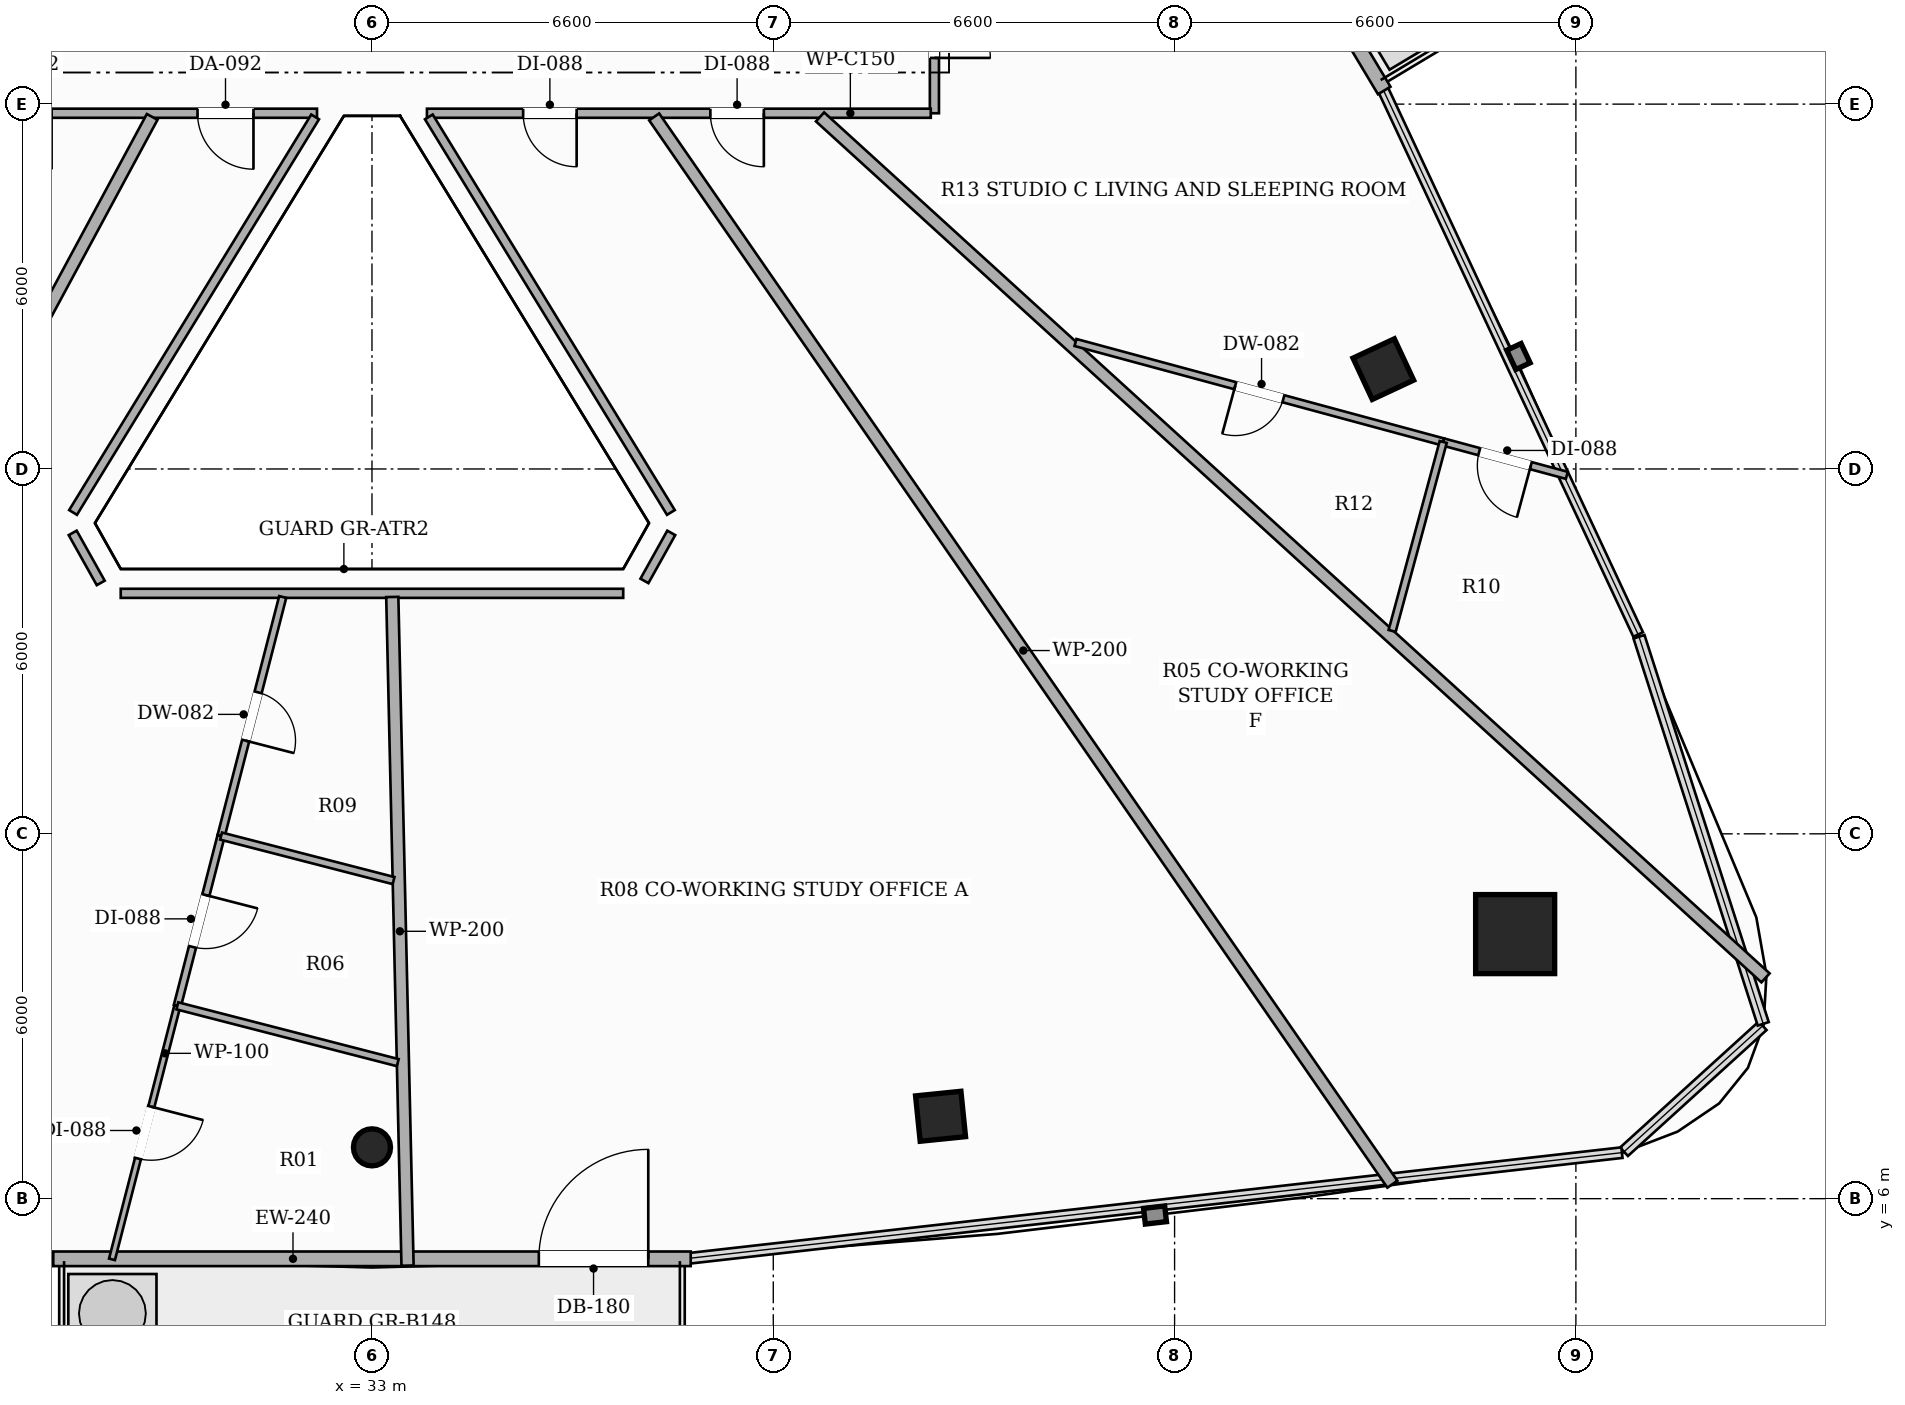
"""IFC4 building model, lengths in metres.
Left out: names, types, materials, properties, quantities, classifications, styles, units other than length and angle.
Written with IfcOpenShell. Run it as: python <this file> out.ifc"""

import sys

from ifc_helpers import new_model, si_unit, direction, frame, frame_2d, origin, origin_2d, place, context, subcontext, project, spatial, rectangle, hollow_rectangle, hollow_circle, extrude, element, fill, save


model = new_model("IFC4")
c1 = context("Model", 3, precision=1e-05, world=origin(), true_north=direction((0.0, 1.0)))
c2 = subcontext(c1, "Body", "Model", "MODEL_VIEW")
j1 = project(units=[si_unit("LENGTHUNIT", "METRE"), si_unit("PLANEANGLEUNIT", "RADIAN")], contexts=[c1])
p1 = place(None, origin())
s1 = spatial("IfcSite", under=j1, at=p1, CompositionType="ELEMENT")
p2 = place(p1, origin())
s2 = spatial("IfcBuilding", under=s1, at=p2, CompositionType="ELEMENT")
p3 = place(p2, frame((0.0, 0.0, 226.1)))
s3 = spatial("IfcBuildingStorey", under=s2, at=p3, CompositionType="ELEMENT", Elevation=226.1)
p4 = place(p3, frame((51.801, 10.351, 0.0), z_axis=(0.0, 0.0, 1.0), x_axis=(1.0, 0.0, 0.0)))
e1 = element("IfcColumn", 1, at=p4, inside=s3, PredefinedType="COLUMN", context=c2, shape_type="SweptSolid", body=[
    extrude(hollow_rectangle(XDim=1.3, YDim=1.3, WallThickness=0.04, at=origin_2d()), origin(), (0.0, 0.0, 1.0), 3.3),
])
p5 = place(p3, frame((33.0, 6.844, 0.0), z_axis=(0.0, 0.0, 1.0), x_axis=(1.0, 0.0, 0.0)))
e2 = element("IfcColumn", 2, at=p5, inside=s3, PredefinedType="COLUMN", context=c2, shape_type="SweptSolid", body=[
    extrude(hollow_circle(Radius=0.305, WallThickness=0.016, at=origin_2d()), origin(), (0.0, 0.0, 1.0), 3.3),
])
for number, where, z_axis, x_axis in (
    (3, (42.351, 7.355, 0.0), (0.0, 0.0, 1.0), (0.995, 0.101, 0.0)),
    (4, (49.633, 19.642, 0.0), (0.0, 0.0, 1.0), (-0.423, 0.906, 0.0)),
):
    element("IfcColumn", number, at=place(p3, frame(where, z_axis=z_axis, x_axis=x_axis)), inside=s3, PredefinedType="COLUMN", context=c2, shape_type="SweptSolid", body=[
        extrude(hollow_rectangle(XDim=0.75, YDim=0.75, WallThickness=0.025, at=origin_2d()), origin(), (0.0, 0.0, 1.0), 3.3),
    ])
p6 = place(p3, frame((27.758, 5.011, 0.0), z_axis=(0.0, 0.0, 1.0), x_axis=(1.0, 0.0, 0.0)))
e5 = element("IfcWall", 5, at=p6, inside=s3, PredefinedType="SOLIDWALL", context=c2, shape_type="SweptSolid", body=[
    extrude(rectangle(XDim=10.484, YDim=0.24, at=frame_2d((5.242, 0.0))), origin(), (0.0, 0.0, 1.0), 2.624),
])
p7 = place(p6, frame((7.986, 0.0, 0.0)))
e6 = element("IfcOpeningElement", 6, at=p7, cuts=e5, PredefinedType="OPENING", context=c2, shape_type="SweptSolid", body=[
    extrude(rectangle(XDim=1.8, YDim=2.2, at=frame_2d((0.9, 1.1))), frame((0.0, 0.13, 0.0), z_axis=(0.0, -1.0, 0.0), x_axis=(1.0, 0.0, 0.0)), (0.0, 0.0, 1.0), 0.26),
])
p8 = place(p3, frame((49.648, 24.224, 0.0), z_axis=(0.0, 0.0, 1.0), x_axis=(-0.514346935205, 0.857582200285, 0.0)))
e7 = element("IfcWall", 7, at=p8, inside=s3, PredefinedType="SOLIDWALL", context=c2, shape_type="SweptSolid", body=[
    extrude(rectangle(XDim=10.133, YDim=0.24, at=frame_2d((5.066, 0.0))), origin(), (0.0, 0.0, 1.0), 2.624),
])
p9 = place(p8, frame((7.635, 0.0, 0.0)))
e8 = element("IfcOpeningElement", 8, at=p9, cuts=e7, PredefinedType="OPENING", context=c2, shape_type="SweptSolid", body=[
    extrude(rectangle(XDim=1.8, YDim=2.2, at=frame_2d((0.9, 1.1))), frame((0.0, 0.13, 0.0), z_axis=(0.0, -1.0, 0.0), x_axis=(1.0, 0.0, 0.0)), (0.0, 0.0, 1.0), 0.26),
])
p10 = place(p3, frame((32.096, 23.85, 0.0), z_axis=(0.0, 0.0, 1.0), x_axis=(-1.0, 0.0, 0.0)))
e9 = element("IfcWall", 9, at=p10, inside=s3, PredefinedType="PARTITIONING", context=c2, shape_type="SweptSolid", body=[
    extrude(rectangle(XDim=8.446, YDim=0.15, at=frame_2d((4.223, 0.0))), origin(), (0.0, 0.0, 1.0), 2.565),
])
p11 = place(p10, frame((4.365, 0.0, 0.0)))
e10 = element("IfcOpeningElement", 10, at=p11, cuts=e9, PredefinedType="OPENING", context=c2, shape_type="SweptSolid", body=[
    extrude(rectangle(XDim=0.92, YDim=2.15, at=frame_2d((0.46, 1.075))), frame((0.0, 0.085, 0.0), z_axis=(0.0, -1.0, 0.0), x_axis=(1.0, 0.0, 0.0)), (0.0, 0.0, 1.0), 0.17),
])
p12 = place(p10, frame((1.045, 0.0, 0.0)))
e11 = element("IfcOpeningElement", 11, at=p12, cuts=e9, PredefinedType="OPENING", context=c2, shape_type="SweptSolid", body=[
    extrude(rectangle(XDim=0.92, YDim=2.15, at=frame_2d((0.46, 1.075))), frame((0.0, 0.085, 0.0), z_axis=(0.0, -1.0, 0.0), x_axis=(1.0, 0.0, 0.0)), (0.0, 0.0, 1.0), 0.17),
])
p13 = place(p3, frame((42.25, 26.59, 0.0), z_axis=(0.0, 0.0, 1.0), x_axis=(0.0, -1.0, 0.0)))
e12 = element("IfcWall", 12, at=p13, inside=s3, PredefinedType="PARTITIONING", context=c2, shape_type="SweptSolid", body=[
    extrude(rectangle(XDim=2.74, YDim=0.15, at=frame_2d((1.37, 0.0))), origin(), (0.0, 0.0, 1.0), 2.773),
])
p14 = place(p13, frame((0.91, 0.0, 0.0)))
e13 = element("IfcOpeningElement", 13, at=p14, cuts=e12, PredefinedType="OPENING", context=c2, shape_type="SweptSolid", body=[
    extrude(rectangle(XDim=0.92, YDim=2.15, at=frame_2d((0.46, 1.075))), frame((0.0, 0.085, 0.0), z_axis=(0.0, -1.0, 0.0), x_axis=(1.0, 0.0, 0.0)), (0.0, 0.0, 1.0), 0.17),
])
p15 = place(p3, frame((42.19, 23.85, 0.0), z_axis=(0.0, 0.0, 1.0), x_axis=(-1.0, 0.0, 0.0)))
e14 = element("IfcWall", 14, at=p15, inside=s3, PredefinedType="PARTITIONING", context=c2, shape_type="SweptSolid", body=[
    extrude(rectangle(XDim=8.286, YDim=0.15, at=frame_2d((4.143, 0.0))), origin(), (0.0, 0.0, 1.0), 2.565),
])
p16 = place(p15, frame((5.824, 0.0, 0.0)))
e15 = element("IfcOpeningElement", 15, at=p16, cuts=e14, PredefinedType="OPENING", context=c2, shape_type="SweptSolid", body=[
    extrude(rectangle(XDim=0.88, YDim=2.1, at=frame_2d((0.44, 1.05))), frame((0.0, 0.085, 0.0), z_axis=(0.0, -1.0, 0.0), x_axis=(1.0, 0.0, 0.0)), (0.0, 0.0, 1.0), 0.17),
])
p17 = place(p15, frame((2.745, 0.0, 0.0)))
e16 = element("IfcOpeningElement", 16, at=p17, cuts=e14, PredefinedType="OPENING", context=c2, shape_type="SweptSolid", body=[
    extrude(rectangle(XDim=0.88, YDim=2.1, at=frame_2d((0.44, 1.05))), frame((0.0, 0.085, 0.0), z_axis=(0.0, -1.0, 0.0), x_axis=(1.0, 0.0, 0.0)), (0.0, 0.0, 1.0), 0.17),
])
p18 = place(p3, frame((33.935, 23.79, 0.0), z_axis=(0.0, 0.0, 1.0), x_axis=(0.521984684225, -0.852954857794, 0.0)))
e17 = element("IfcWall", 17, at=p18, inside=s3, PredefinedType="PARTITIONING", context=c2, shape_type="SweptSolid", body=[
    extrude(rectangle(XDim=7.626, YDim=0.15, at=frame_2d((3.813, 0.0))), origin(), (0.0, 0.0, 1.0), 2.773),
])
p19 = place(p3, frame((37.922, 16.949, 0.0), z_axis=(0.0, 0.0, 1.0), x_axis=(-0.48754316559, -0.873098884255, 0.0)))
e18 = element("IfcWall", 18, at=p19, inside=s3, PredefinedType="PARTITIONING", context=c2, shape_type="SweptSolid", body=[
    extrude(rectangle(XDim=0.905, YDim=0.15, at=frame_2d((0.452, 0.0))), origin(), (0.0, 0.0, 1.0), 3.06),
])
p20 = place(p3, frame((37.132, 15.955, 0.0), z_axis=(0.0, 0.0, 1.0), x_axis=(-1.0, 0.0, 0.0)))
e19 = element("IfcWall", 19, at=p20, inside=s3, PredefinedType="PARTITIONING", context=c2, shape_type="SweptSolid", body=[
    extrude(rectangle(XDim=8.264, YDim=0.15, at=frame_2d((4.132, 0.0))), origin(), (0.0, 0.0, 1.0), 2.773),
])
p21 = place(p3, frame((28.539, 16.126, 0.0), z_axis=(0.0, 0.0, 1.0), x_axis=(-0.488847636641, 0.87236918111, 0.0)))
e20 = element("IfcWall", 20, at=p21, inside=s3, PredefinedType="PARTITIONING", context=c2, shape_type="SweptSolid", body=[
    extrude(rectangle(XDim=0.943, YDim=0.15, at=frame_2d((0.472, 0.0))), origin(), (0.0, 0.0, 1.0), 3.06),
])
p22 = place(p3, frame((28.084, 17.285, 0.0), z_axis=(0.0, 0.0, 1.0), x_axis=(0.521984684225, 0.852954857794, 0.0)))
e21 = element("IfcWall", 21, at=p22, inside=s3, PredefinedType="PARTITIONING", context=c2, shape_type="SweptSolid", body=[
    extrude(rectangle(XDim=7.626, YDim=0.15, at=frame_2d((3.813, 0.0))), origin(), (0.0, 0.0, 1.0), 2.773),
])
p23 = place(p3, frame((33.585, 4.899, 0.0), z_axis=(0.0, 0.0, 1.0), x_axis=(-0.022818213595, 0.999739630668, 0.0)))
e22 = element("IfcWall", 22, at=p23, inside=s3, PredefinedType="PARTITIONING", context=c2, shape_type="SweptSolid", body=[
    extrude(rectangle(XDim=10.999, YDim=0.2, at=frame_2d((5.5, 0.0))), origin(), (0.0, 0.0, 1.0), 2.492),
])
p24 = place(p3, frame((37.641, 23.79, 0.0), z_axis=(0.0, 0.0, 1.0), x_axis=(0.568876812748, -0.822422745258, 0.0)))
e23 = element("IfcWall", 23, at=p24, inside=s3, PredefinedType="PARTITIONING", context=c2, shape_type="SweptSolid", body=[
    extrude(rectangle(XDim=21.342, YDim=0.2, at=frame_2d((10.671, 0.0))), origin(), (0.0, 0.0, 1.0), 2.492),
])
p25 = place(p3, frame((29.385, 23.79, 0.0), z_axis=(0.0, 0.0, 1.0), x_axis=(-0.474361203305, -0.880330306646, 0.0)))
e24 = element("IfcWall", 24, at=p25, inside=s3, PredefinedType="PARTITIONING", context=c2, shape_type="SweptSolid", body=[
    extrude(rectangle(XDim=20.44, YDim=0.2, at=frame_2d((10.22, 0.0))), origin(), (0.0, 0.0, 1.0), 2.492),
])
p26 = place(p3, frame((55.919, 9.631, 0.0), z_axis=(0.0, 0.0, 1.0), x_axis=(-0.739406671307, 0.673259069324, 0.0)))
e25 = element("IfcWall", 25, at=p26, inside=s3, PredefinedType="PARTITIONING", context=c2, shape_type="SweptSolid", body=[
    extrude(rectangle(XDim=21.031, YDim=0.2, at=frame_2d((10.515, 0.0))), origin(), (0.0, 0.0, 1.0), 2.492),
])
p27 = place(p3, frame((50.618, 18.444, 0.0), z_axis=(0.0, 0.0, 1.0), x_axis=(-0.96530580675, 0.261122001091, 0.0)))
e26 = element("IfcWall", 26, at=p27, inside=s3, PredefinedType="PARTITIONING", context=c2, shape_type="SweptSolid", body=[
    extrude(rectangle(XDim=6.265, YDim=0.12, at=frame_2d((3.133, 0.0))), origin(), (0.0, 0.0, 1.0), 2.492),
])
p28 = place(p27, frame((2.723, 0.0, 0.0)))
e27 = element("IfcOpeningElement", 27, at=p28, cuts=e26, PredefinedType="OPENING", context=c2, shape_type="SweptSolid", body=[
    extrude(rectangle(XDim=0.82, YDim=2.1, at=frame_2d((0.41, 1.05))), frame((0.0, 0.07, 0.0), z_axis=(0.0, -1.0, 0.0), x_axis=(1.0, 0.0, 0.0)), (0.0, 0.0, 1.0), 0.14),
])
p29 = place(p3, frame((52.651, 17.895, 0.0), z_axis=(0.0, 0.0, 1.0), x_axis=(-0.96540836449, 0.260742573765, 0.0)))
e28 = element("IfcWall", 28, at=p29, inside=s3, PredefinedType="PARTITIONING", context=c2, shape_type="SweptSolid", body=[
    extrude(rectangle(XDim=2.106, YDim=0.12, at=frame_2d((1.053, 0.0))), origin(), (0.0, 0.0, 1.0), 2.619),
])
p30 = place(p29, frame((0.613, 0.0, 0.0)))
e29 = element("IfcOpeningElement", 29, at=p30, cuts=e28, PredefinedType="OPENING", context=c2, shape_type="SweptSolid", body=[
    extrude(rectangle(XDim=0.88, YDim=2.1, at=frame_2d((0.44, 1.05))), frame((0.0, 0.07, 0.0), z_axis=(0.0, -1.0, 0.0), x_axis=(1.0, 0.0, 0.0)), (0.0, 0.0, 1.0), 0.14),
])
p31 = place(p3, frame((50.618, 18.444, 0.0), z_axis=(0.0, 0.0, 1.0), x_axis=(-0.260928129887, -0.965358229381, 0.0)))
e30 = element("IfcWall", 30, at=p31, inside=s3, PredefinedType="PARTITIONING", context=c2, shape_type="SweptSolid", body=[
    extrude(rectangle(XDim=3.219, YDim=0.12, at=frame_2d((1.609, 0.0))), origin(), (0.0, 0.0, 1.0), 2.492),
])
p32 = place(p3, frame((31.532, 15.895, 0.0), z_axis=(0.0, 0.0, 1.0), x_axis=(-0.24968708983, -0.968326575682, 0.0)))
e31 = element("IfcWall", 31, at=p32, inside=s3, PredefinedType="PARTITIONING", context=c2, shape_type="SweptSolid", body=[
    extrude(rectangle(XDim=4.061, YDim=0.12, at=frame_2d((2.03, 0.0))), origin(), (0.0, 0.0, 1.0), 3.06),
])
p33 = place(p32, frame((1.62, 0.0, 0.0)))
e32 = element("IfcOpeningElement", 32, at=p33, cuts=e31, PredefinedType="OPENING", context=c2, shape_type="SweptSolid", body=[
    extrude(rectangle(XDim=0.82, YDim=2.1, at=frame_2d((0.41, 1.05))), frame((0.0, 0.07, 0.0), z_axis=(0.0, -1.0, 0.0), x_axis=(1.0, 0.0, 0.0)), (0.0, 0.0, 1.0), 0.14),
])
p34 = place(p3, frame((30.518, 11.963, 0.0), z_axis=(0.0, 0.0, 1.0), x_axis=(-0.249383700926, -0.968404755106, 0.0)))
e33 = element("IfcWall", 33, at=p34, inside=s3, PredefinedType="PARTITIONING", context=c2, shape_type="SweptSolid", body=[
    extrude(rectangle(XDim=2.883, YDim=0.12, at=frame_2d((1.441, 0.0))), origin(), (0.0, 0.0, 1.0), 3.06),
])
p35 = place(p34, frame((1.002, 0.0, 0.0)))
e34 = element("IfcOpeningElement", 34, at=p35, cuts=e33, PredefinedType="OPENING", context=c2, shape_type="SweptSolid", body=[
    extrude(rectangle(XDim=0.88, YDim=2.1, at=frame_2d((0.44, 1.05))), frame((0.0, 0.07, 0.0), z_axis=(0.0, -1.0, 0.0), x_axis=(1.0, 0.0, 0.0)), (0.0, 0.0, 1.0), 0.14),
])
p36 = place(p3, frame((29.799, 9.171, 0.0), z_axis=(0.0, 0.0, 1.0), x_axis=(-0.249680784234, -0.968328201585, 0.0)))
e35 = element("IfcWall", 35, at=p36, inside=s3, PredefinedType="PARTITIONING", context=c2, shape_type="SweptSolid", body=[
    extrude(rectangle(XDim=4.305, YDim=0.1, at=frame_2d((2.153, 0.0))), origin(), (0.0, 0.0, 1.0), 2.492),
])
p37 = place(p36, frame((1.713, 0.0, 0.0)))
e36 = element("IfcOpeningElement", 36, at=p37, cuts=e35, PredefinedType="OPENING", context=c2, shape_type="SweptSolid", body=[
    extrude(rectangle(XDim=0.88, YDim=2.1, at=frame_2d((0.44, 1.05))), frame((0.0, 0.06, 0.0), z_axis=(0.0, -1.0, 0.0), x_axis=(1.0, 0.0, 0.0)), (0.0, 0.0, 1.0), 0.12),
])
p38 = place(p3, frame((33.355, 11.231, 0.0), z_axis=(0.0, 0.0, 1.0), x_axis=(-0.968291630449, 0.249822573846, 0.0)))
e37 = element("IfcWall", 37, at=p38, inside=s3, PredefinedType="PARTITIONING", context=c2, shape_type="SweptSolid", body=[
    extrude(rectangle(XDim=2.93, YDim=0.12, at=frame_2d((1.465, 0.0))), origin(), (0.0, 0.0, 1.0), 2.773),
])
p39 = place(p3, frame((33.424, 8.237, 0.0), z_axis=(0.0, 0.0, 1.0), x_axis=(-0.968383623763, 0.249465743595, 0.0)))
e38 = element("IfcWall", 38, at=p39, inside=s3, PredefinedType="PARTITIONING", context=c2, shape_type="SweptSolid", body=[
    extrude(rectangle(XDim=3.743, YDim=0.12, at=frame_2d((1.872, 0.0))), origin(), (0.0, 0.0, 1.0), 2.773),
])
p40 = place(p7, origin())
e39 = element("IfcDoor", 39, at=p40, inside=s3, OperationType="SINGLE_SWING_RIGHT", PredefinedType="DOOR", context=c2, shape_type="SweptSolid", body=[
    extrude(rectangle(XDim=1.8, YDim=2.2, at=frame_2d((0.9, 1.1))), frame((0.0, 0.025, 0.0), z_axis=(0.0, -1.0, 0.0), x_axis=(1.0, 0.0, 0.0)), (0.0, 0.0, 1.0), 0.05),
])
fill(e6, e39)
p41 = place(p16, origin())
e40 = element("IfcDoor", 40, at=p41, inside=s3, OperationType="SINGLE_SWING_LEFT", PredefinedType="DOOR", context=c2, shape_type="SweptSolid", body=[
    extrude(rectangle(XDim=0.88, YDim=2.1, at=frame_2d((0.44, 1.05))), frame((0.0, 0.025, 0.0), z_axis=(0.0, -1.0, 0.0), x_axis=(1.0, 0.0, 0.0)), (0.0, 0.0, 1.0), 0.05),
])
fill(e15, e40)
p42 = place(p14, origin())
e41 = element("IfcDoor", 41, at=p42, inside=s3, OperationType="SINGLE_SWING_RIGHT", PredefinedType="DOOR", context=c2, shape_type="SweptSolid", body=[
    extrude(rectangle(XDim=0.92, YDim=2.15, at=frame_2d((0.46, 1.075))), frame((0.0, 0.025, 0.0), z_axis=(0.0, -1.0, 0.0), x_axis=(1.0, 0.0, 0.0)), (0.0, 0.0, 1.0), 0.05),
])
fill(e13, e41)
p43 = place(p28, origin())
e42 = element("IfcDoor", 42, at=p43, inside=s3, OperationType="SINGLE_SWING_RIGHT", PredefinedType="DOOR", context=c2, shape_type="SweptSolid", body=[
    extrude(rectangle(XDim=0.82, YDim=2.1, at=frame_2d((0.41, 1.05))), frame((0.0, 0.025, 0.0), z_axis=(0.0, -1.0, 0.0), x_axis=(1.0, 0.0, 0.0)), (0.0, 0.0, 1.0), 0.05),
])
fill(e27, e42)
p44 = place(p30, origin())
e43 = element("IfcDoor", 43, at=p44, inside=s3, OperationType="SINGLE_SWING_LEFT", PredefinedType="DOOR", context=c2, shape_type="SweptSolid", body=[
    extrude(rectangle(XDim=0.88, YDim=2.1, at=frame_2d((0.44, 1.05))), frame((0.0, 0.025, 0.0), z_axis=(0.0, -1.0, 0.0), x_axis=(1.0, 0.0, 0.0)), (0.0, 0.0, 1.0), 0.05),
])
fill(e29, e43)
p45 = place(p12, origin())
e44 = element("IfcDoor", 44, at=p45, inside=s3, OperationType="SINGLE_SWING_LEFT", PredefinedType="DOOR", context=c2, shape_type="SweptSolid", body=[
    extrude(rectangle(XDim=0.92, YDim=2.15, at=frame_2d((0.46, 1.075))), frame((0.0, 0.025, 0.0), z_axis=(0.0, -1.0, 0.0), x_axis=(1.0, 0.0, 0.0)), (0.0, 0.0, 1.0), 0.05),
])
fill(e11, e44)
p46 = place(p33, origin())
e45 = element("IfcDoor", 45, at=p46, inside=s3, OperationType="SINGLE_SWING_RIGHT", PredefinedType="DOOR", context=c2, shape_type="SweptSolid", body=[
    extrude(rectangle(XDim=0.82, YDim=2.1, at=frame_2d((0.41, 1.05))), frame((0.0, 0.025, 0.0), z_axis=(0.0, -1.0, 0.0), x_axis=(1.0, 0.0, 0.0)), (0.0, 0.0, 1.0), 0.05),
])
fill(e32, e45)
p47 = place(p35, origin())
e46 = element("IfcDoor", 46, at=p47, inside=s3, OperationType="SINGLE_SWING_LEFT", PredefinedType="DOOR", context=c2, shape_type="SweptSolid", body=[
    extrude(rectangle(XDim=0.88, YDim=2.1, at=frame_2d((0.44, 1.05))), frame((0.0, 0.025, 0.0), z_axis=(0.0, -1.0, 0.0), x_axis=(1.0, 0.0, 0.0)), (0.0, 0.0, 1.0), 0.05),
])
fill(e34, e46)
p48 = place(p37, origin())
e47 = element("IfcDoor", 47, at=p48, inside=s3, OperationType="SINGLE_SWING_LEFT", PredefinedType="DOOR", context=c2, shape_type="SweptSolid", body=[
    extrude(rectangle(XDim=0.88, YDim=2.1, at=frame_2d((0.44, 1.05))), frame((0.0, 0.025, 0.0), z_axis=(0.0, -1.0, 0.0), x_axis=(1.0, 0.0, 0.0)), (0.0, 0.0, 1.0), 0.05),
])
fill(e36, e47)
p49 = place(p17, origin())
e48 = element("IfcDoor", 48, at=p49, inside=s3, OperationType="SINGLE_SWING_LEFT", PredefinedType="DOOR", context=c2, shape_type="SweptSolid", body=[
    extrude(rectangle(XDim=0.88, YDim=2.1, at=frame_2d((0.44, 1.05))), frame((0.0, 0.025, 0.0), z_axis=(0.0, -1.0, 0.0), x_axis=(1.0, 0.0, 0.0)), (0.0, 0.0, 1.0), 0.05),
])
fill(e16, e48)
save(model, sys.argv[1])
